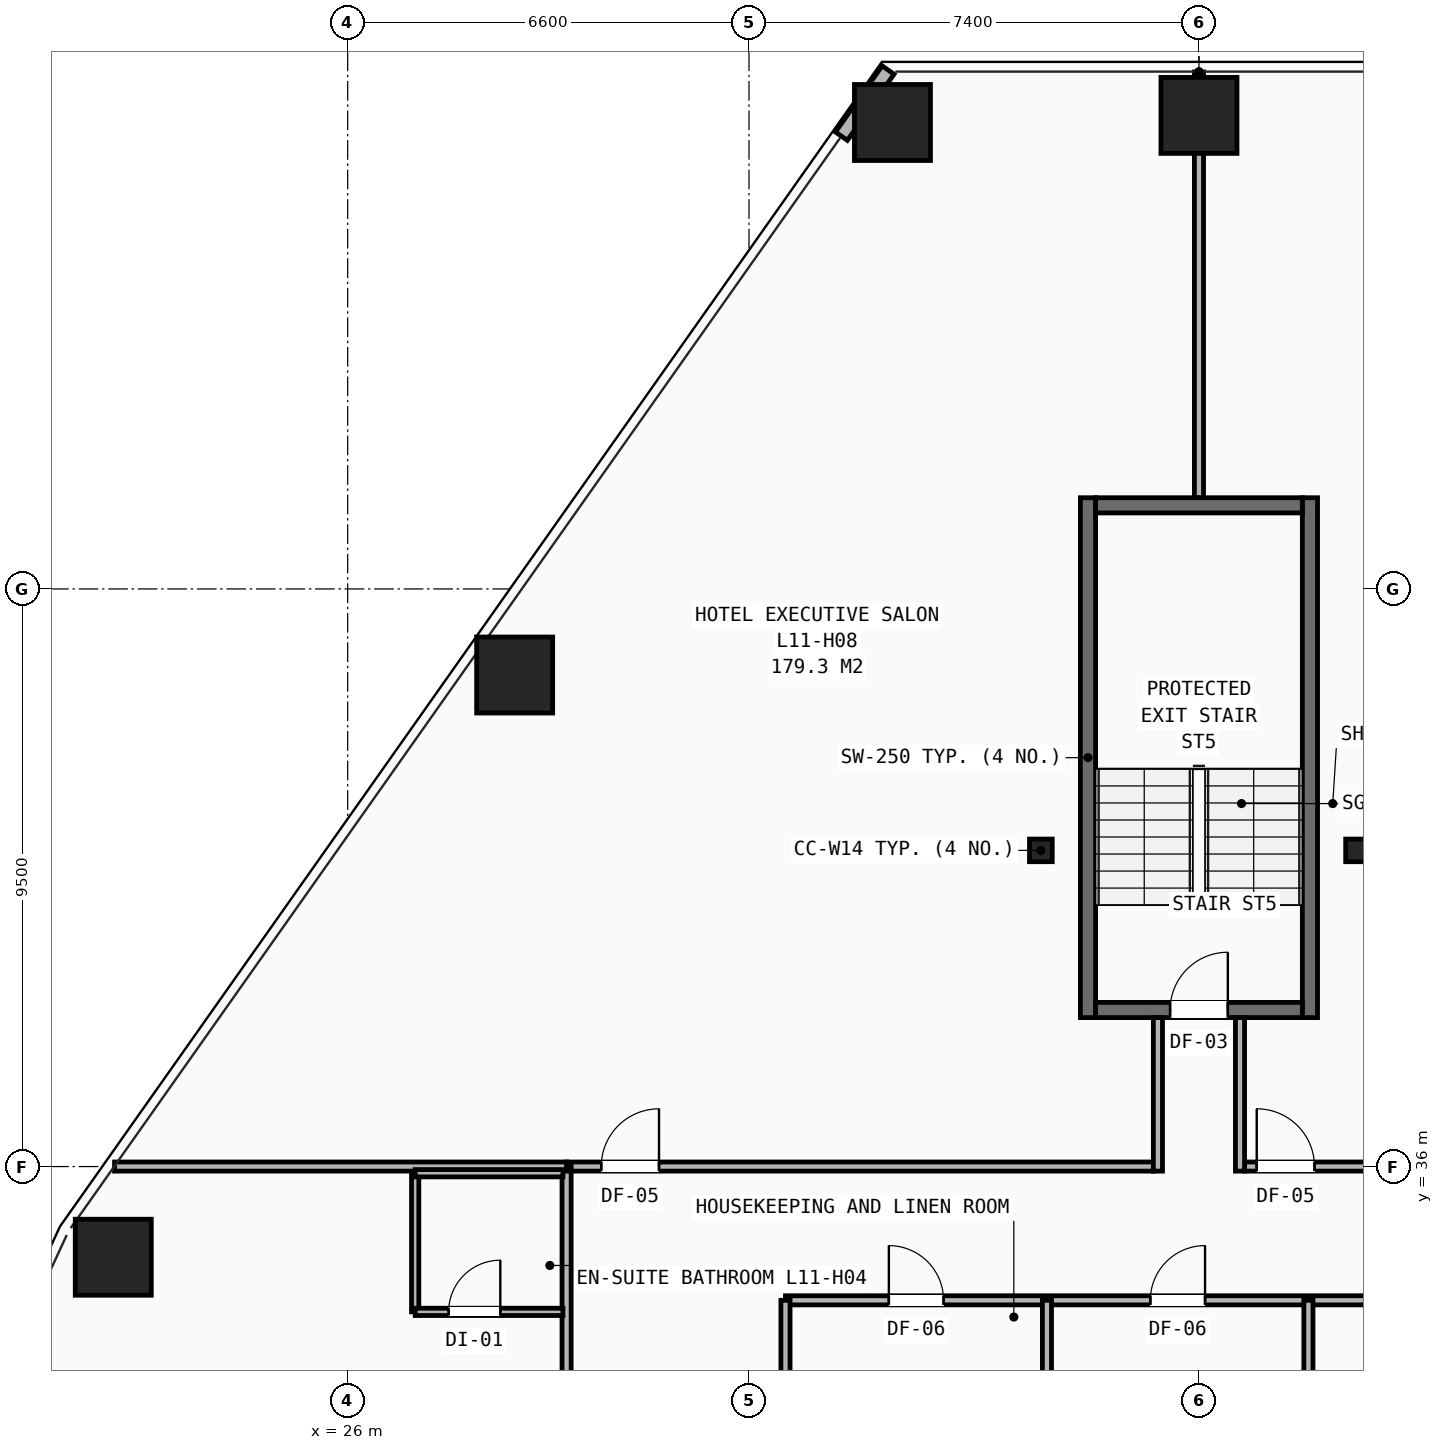
"""IFC4 building model, lengths in metres.
Left out: names, types, materials, properties, quantities, classifications, styles, units other than length and angle.
Written with IfcOpenShell. Run it as: python <this file> out.ifc"""

import sys

from ifc_helpers import new_model, si_unit, direction, frame, frame_2d, origin, origin_2d, place, context, subcontext, project, spatial, rectangle, hollow_rectangle, i_section, extrude, element, fill, save


model = new_model("IFC4")
c1 = context("Model", 3, precision=1e-05, world=origin(), true_north=direction((0.0, 1.0)))
c2 = subcontext(c1, "Body", "Model", "MODEL_VIEW")
j1 = project(units=[si_unit("LENGTHUNIT", "METRE"), si_unit("PLANEANGLEUNIT", "RADIAN")], contexts=[c1])
p1 = place(None, origin())
s1 = spatial("IfcSite", under=j1, at=p1, CompositionType="ELEMENT")
p2 = place(p1, origin())
s2 = spatial("IfcBuilding", under=s1, at=p2, CompositionType="ELEMENT")
p3 = place(p2, frame((0.0, 0.0, 43.2)))
s3 = spatial("IfcBuildingStorey", under=s2, at=p3, CompositionType="ELEMENT", Elevation=43.2)
for number, where, z_axis, x_axis in (
    (1, (37.4, 41.2, 0.0), (0.0, 0.0, 1.0), (1.0, 0.0, 0.0)),
    (2, (42.6, 41.2, 0.0), (0.0, 0.0, 1.0), (1.0, 0.0, 0.0)),
):
    element("IfcColumn", number, at=place(p3, frame(where, z_axis=z_axis, x_axis=x_axis)), inside=s3, PredefinedType="COLUMN", context=c2, shape_type="SweptSolid", body=[
        extrude(i_section(OverallWidth=0.374, OverallDepth=0.372, WebThickness=0.016, FlangeThickness=0.026, at=origin_2d()), origin(), (0.0, 0.0, 1.0), 3.2),
    ])
for number, where, z_axis, x_axis in (
    (3, (40.0, 53.289, 0.0), (0.0, 0.0, 1.0), (1.0, 0.0, 0.0)),
    (4, (34.959, 53.172, 0.0), (0.0, 0.0, 1.0), (1.0, 0.0, 0.0)),
    (5, (28.746, 44.084, 0.0), (0.0, 0.0, 1.0), (1.0, 0.0, 0.0)),
    (6, (22.145, 34.509, 0.0), (0.0, 0.0, 1.0), (1.0, 0.0, 0.0)),
):
    element("IfcColumn", number, at=place(p3, frame(where, z_axis=z_axis, x_axis=x_axis)), inside=s3, PredefinedType="COLUMN", context=c2, shape_type="SweptSolid", body=[
        extrude(hollow_rectangle(XDim=1.25, YDim=1.25, WallThickness=0.08, at=origin_2d()), origin(), (0.0, 0.0, 1.0), 3.2),
    ])
p4 = place(p3, frame((34.887, 54.035, 0.0), z_axis=(0.0, 0.0, 1.0), x_axis=(-0.576510403346, -0.817089808304, 0.0)))
e7 = element("IfcWall", 7, at=p4, inside=s3, PredefinedType="SHEAR", context=c2, shape_type="SweptSolid", body=[
    extrude(rectangle(XDim=1.332, YDim=0.24, at=frame_2d((0.666, 0.0))), origin(), (0.0, 0.0, 1.0), 2.263),
])
p5 = place(p3, frame((33.2, 33.8, 0.0), z_axis=(0.0, 0.0, 1.0), x_axis=(1.0, 0.0, 0.0)))
e8 = element("IfcWall", 8, at=p5, inside=s3, PredefinedType="PARTITIONING", context=c2, shape_type="SweptSolid", body=[
    extrude(rectangle(XDim=13.0, YDim=0.15, at=frame_2d((6.5, 0.0))), origin(), (0.0, 0.0, 1.0), 2.98),
])
p6 = place(p5, frame((1.7, 0.0, 0.0)))
e9 = element("IfcOpeningElement", 9, at=p6, cuts=e8, PredefinedType="OPENING", context=c2, shape_type="SweptSolid", body=[
    extrude(rectangle(XDim=0.9, YDim=2.1, at=frame_2d((0.45, 1.05))), frame((0.0, 0.085, 0.0), z_axis=(0.0, -1.0, 0.0), x_axis=(1.0, 0.0, 0.0)), (0.0, 0.0, 1.0), 0.17),
])
p7 = place(p5, frame((6.0, 0.0, 0.0)))
e10 = element("IfcOpeningElement", 10, at=p7, cuts=e8, PredefinedType="OPENING", context=c2, shape_type="SweptSolid", body=[
    extrude(rectangle(XDim=0.9, YDim=2.1, at=frame_2d((0.45, 1.05))), frame((0.0, 0.085, 0.0), z_axis=(0.0, -1.0, 0.0), x_axis=(1.0, 0.0, 0.0)), (0.0, 0.0, 1.0), 0.17),
])
p8 = place(p5, frame((10.35, 0.0, 0.0)))
e11 = element("IfcOpeningElement", 11, at=p8, cuts=e8, PredefinedType="OPENING", context=c2, shape_type="SweptSolid", body=[
    extrude(rectangle(XDim=0.9, YDim=2.1, at=frame_2d((0.45, 1.05))), frame((0.0, 0.085, 0.0), z_axis=(0.0, -1.0, 0.0), x_axis=(1.0, 0.0, 0.0)), (0.0, 0.0, 1.0), 0.17),
])
for number, where, z_axis, x_axis in (
    (12, (33.2, 31.2, 0.0), (0.0, 0.0, 1.0), (0.0, 1.0, 0.0)),
    (13, (37.5, 31.2, 0.0), (0.0, 0.0, 1.0), (0.0, 1.0, 0.0)),
    (14, (41.8, 31.2, 0.0), (0.0, 0.0, 1.0), (0.0, 1.0, 0.0)),
):
    element("IfcWall", number, at=place(p3, frame(where, z_axis=z_axis, x_axis=x_axis)), inside=s3, PredefinedType="PARTITIONING", context=c2, shape_type="SweptSolid", body=[
        extrude(rectangle(XDim=2.6, YDim=0.15, at=frame_2d((1.3, 0.0))), origin(), (0.0, 0.0, 1.0), 2.431),
    ])
p9 = place(p3, frame((29.6, 36.0, 0.0), z_axis=(0.0, 0.0, 1.0), x_axis=(1.0, 0.0, 0.0)))
e15 = element("IfcWall", 15, at=p9, inside=s3, PredefinedType="PARTITIONING", context=c2, shape_type="SweptSolid", body=[
    extrude(rectangle(XDim=9.65, YDim=0.15, at=frame_2d((4.825, 0.0))), origin(), (0.0, 0.0, 1.0), 2.98),
])
p10 = place(p9, frame((0.57, 0.0, 0.0)))
e16 = element("IfcOpeningElement", 16, at=p10, cuts=e15, PredefinedType="OPENING", context=c2, shape_type="SweptSolid", body=[
    extrude(rectangle(XDim=0.95, YDim=2.1, at=frame_2d((0.475, 1.05))), frame((0.0, 0.085, 0.0), z_axis=(0.0, -1.0, 0.0), x_axis=(1.0, 0.0, 0.0)), (0.0, 0.0, 1.0), 0.17),
])
p11 = place(p3, frame((40.75, 36.0, 0.0), z_axis=(0.0, 0.0, 1.0), x_axis=(1.0, 0.0, 0.0)))
e17 = element("IfcWall", 17, at=p11, inside=s3, PredefinedType="PARTITIONING", context=c2, shape_type="SweptSolid", body=[
    extrude(rectangle(XDim=9.65, YDim=0.15, at=frame_2d((4.825, 0.0))), origin(), (0.0, 0.0, 1.0), 2.513),
])
p12 = place(p11, frame((0.2, 0.0, 0.0)))
e18 = element("IfcOpeningElement", 18, at=p12, cuts=e17, PredefinedType="OPENING", context=c2, shape_type="SweptSolid", body=[
    extrude(rectangle(XDim=0.95, YDim=2.1, at=frame_2d((0.475, 1.05))), frame((0.0, 0.085, 0.0), z_axis=(0.0, -1.0, 0.0), x_axis=(1.0, 0.0, 0.0)), (0.0, 0.0, 1.0), 0.17),
])
p13 = place(p3, frame((29.6, 14.1, 0.0), z_axis=(0.0, 0.0, 1.0), x_axis=(0.0, 1.0, 0.0)))
e19 = element("IfcWall", 19, at=p13, inside=s3, PredefinedType="PARTITIONING", context=c2, shape_type="SweptSolid", body=[
    extrude(rectangle(XDim=21.9, YDim=0.15, at=frame_2d((10.95, 0.0))), origin(), (0.0, 0.0, 1.0), 2.191),
])
p14 = place(p13, frame((0.42, 0.0, 0.0)))
e20 = element("IfcOpeningElement", 20, at=p14, cuts=e19, PredefinedType="OPENING", context=c2, shape_type="SweptSolid", body=[
    extrude(rectangle(XDim=0.95, YDim=2.1, at=frame_2d((0.475, 1.05))), frame((0.0, 0.085, 0.0), z_axis=(0.0, -1.0, 0.0), x_axis=(1.0, 0.0, 0.0)), (0.0, 0.0, 1.0), 0.17),
])
p15 = place(p13, frame((11.32, 0.0, 0.0)))
e21 = element("IfcOpeningElement", 21, at=p15, cuts=e19, PredefinedType="OPENING", context=c2, shape_type="SweptSolid", body=[
    extrude(rectangle(XDim=0.95, YDim=2.1, at=frame_2d((0.475, 1.05))), frame((0.0, 0.085, 0.0), z_axis=(0.0, -1.0, 0.0), x_axis=(1.0, 0.0, 0.0)), (0.0, 0.0, 1.0), 0.17),
])
p16 = place(p3, frame((22.166, 36.0, 0.0), z_axis=(0.0, 0.0, 1.0), x_axis=(1.0, 0.0, 0.0)))
e22 = element("IfcWall", 22, at=p16, inside=s3, PredefinedType="PARTITIONING", context=c2, shape_type="SweptSolid", body=[
    extrude(rectangle(XDim=7.434, YDim=0.15, at=frame_2d((3.717, 0.0))), origin(), (0.0, 0.0, 1.0), 2.268),
])
p17 = place(p3, frame((27.11, 33.61, 0.0), z_axis=(0.0, 0.0, 1.0), x_axis=(0.0, 1.0, 0.0)))
e23 = element("IfcWall", 23, at=p17, inside=s3, PredefinedType="PARTITIONING", context=c2, shape_type="SweptSolid", body=[
    extrude(rectangle(XDim=2.28, YDim=0.12, at=frame_2d((1.14, 0.0))), origin(), (0.0, 0.0, 1.0), 2.513),
])
p18 = place(p3, frame((27.11, 33.61, 0.0), z_axis=(0.0, 0.0, 1.0), x_axis=(1.0, 0.0, 0.0)))
e24 = element("IfcWall", 24, at=p18, inside=s3, PredefinedType="PARTITIONING", context=c2, shape_type="SweptSolid", body=[
    extrude(rectangle(XDim=2.43, YDim=0.12, at=frame_2d((1.215, 0.0))), origin(), (0.0, 0.0, 1.0), 2.513),
])
p19 = place(p18, frame((0.55, 0.0, 0.0)))
e25 = element("IfcOpeningElement", 25, at=p19, cuts=e24, PredefinedType="OPENING", context=c2, shape_type="SweptSolid", body=[
    extrude(rectangle(XDim=0.85, YDim=2.05, at=frame_2d((0.425, 1.025))), frame((0.0, 0.07, 0.0), z_axis=(0.0, -1.0, 0.0), x_axis=(1.0, 0.0, 0.0)), (0.0, 0.0, 1.0), 0.14),
])
p20 = place(p3, frame((27.11, 35.89, 0.0), z_axis=(0.0, 0.0, 1.0), x_axis=(1.0, 0.0, 0.0)))
e26 = element("IfcWall", 26, at=p20, inside=s3, PredefinedType="PARTITIONING", context=c2, shape_type="SweptSolid", body=[
    extrude(rectangle(XDim=2.43, YDim=0.12, at=frame_2d((1.215, 0.0))), origin(), (0.0, 0.0, 1.0), 2.513),
])
p21 = place(p3, frame((40.0, 47.0, 0.0), z_axis=(0.0, 0.0, 1.0), x_axis=(0.0, 1.0, 0.0)))
e27 = element("IfcWall", 27, at=p21, inside=s3, PredefinedType="PARTITIONING", context=c2, shape_type="SweptSolid", body=[
    extrude(rectangle(XDim=7.004, YDim=0.15, at=frame_2d((3.502, 0.0))), origin(), (0.0, 0.0, 1.0), 2.268),
])
for number, where, z_axis, x_axis in (
    (28, (38.175, 38.45, 0.0), (0.0, 0.0, 1.0), (0.0, 1.0, 0.0)),
    (29, (41.825, 38.45, 0.0), (0.0, 0.0, 1.0), (0.0, 1.0, 0.0)),
):
    element("IfcWall", number, at=place(p3, frame(where, z_axis=z_axis, x_axis=x_axis)), inside=s3, PredefinedType="SHEAR", context=c2, shape_type="SweptSolid", body=[
        extrude(rectangle(XDim=8.55, YDim=0.25, at=frame_2d((4.275, 0.0))), origin(), (0.0, 0.0, 1.0), 2.98),
    ])
p22 = place(p3, frame((38.3, 38.575, 0.0), z_axis=(0.0, 0.0, 1.0), x_axis=(1.0, 0.0, 0.0)))
e30 = element("IfcWall", 30, at=p22, inside=s3, PredefinedType="SHEAR", context=c2, shape_type="SweptSolid", body=[
    extrude(rectangle(XDim=3.4, YDim=0.25, at=frame_2d((1.7, 0.0))), origin(), (0.0, 0.0, 1.0), 2.98),
])
p23 = place(p22, frame((1.225, 0.0, 0.0)))
e31 = element("IfcOpeningElement", 31, at=p23, cuts=e30, PredefinedType="OPENING", context=c2, shape_type="SweptSolid", body=[
    extrude(rectangle(XDim=0.95, YDim=2.1, at=frame_2d((0.475, 1.05))), frame((0.0, 0.135, 0.0), z_axis=(0.0, -1.0, 0.0), x_axis=(1.0, 0.0, 0.0)), (0.0, 0.0, 1.0), 0.27),
])
p24 = place(p3, frame((38.3, 46.875, 0.0), z_axis=(0.0, 0.0, 1.0), x_axis=(1.0, 0.0, 0.0)))
e32 = element("IfcWall", 32, at=p24, inside=s3, PredefinedType="SHEAR", context=c2, shape_type="SweptSolid", body=[
    extrude(rectangle(XDim=3.4, YDim=0.25, at=frame_2d((1.7, 0.0))), origin(), (0.0, 0.0, 1.0), 2.98),
])
for number, where, z_axis, x_axis in (
    (33, (39.325, 35.925, 0.0), (0.0, 0.0, 1.0), (0.0, 1.0, 0.0)),
    (34, (40.675, 35.925, 0.0), (0.0, 0.0, 1.0), (0.0, 1.0, 0.0)),
):
    element("IfcWall", number, at=place(p3, frame(where, z_axis=z_axis, x_axis=x_axis)), inside=s3, PredefinedType="PARTITIONING", context=c2, shape_type="SweptSolid", body=[
        extrude(rectangle(XDim=2.525, YDim=0.15, at=frame_2d((1.262, 0.0))), origin(), (0.0, 0.0, 1.0), 2.98),
    ])
p25 = place(p6, origin())
e35 = element("IfcDoor", 35, at=p25, inside=s3, OperationType="SINGLE_SWING_LEFT", PredefinedType="DOOR", context=c2, shape_type="SweptSolid", body=[
    extrude(rectangle(XDim=0.9, YDim=2.1, at=frame_2d((0.45, 1.05))), frame((0.0, 0.025, 0.0), z_axis=(0.0, -1.0, 0.0), x_axis=(1.0, 0.0, 0.0)), (0.0, 0.0, 1.0), 0.05),
])
fill(e9, e35)
p26 = place(p7, origin())
e36 = element("IfcDoor", 36, at=p26, inside=s3, OperationType="SINGLE_SWING_RIGHT", PredefinedType="DOOR", context=c2, shape_type="SweptSolid", body=[
    extrude(rectangle(XDim=0.9, YDim=2.1, at=frame_2d((0.45, 1.05))), frame((0.0, 0.025, 0.0), z_axis=(0.0, -1.0, 0.0), x_axis=(1.0, 0.0, 0.0)), (0.0, 0.0, 1.0), 0.05),
])
fill(e10, e36)
p27 = place(p19, origin())
e37 = element("IfcDoor", 37, at=p27, inside=s3, OperationType="SINGLE_SWING_RIGHT", PredefinedType="DOOR", context=c2, shape_type="SweptSolid", body=[
    extrude(rectangle(XDim=0.85, YDim=2.05, at=frame_2d((0.425, 1.025))), frame((0.0, 0.025, 0.0), z_axis=(0.0, -1.0, 0.0), x_axis=(1.0, 0.0, 0.0)), (0.0, 0.0, 1.0), 0.05),
])
fill(e25, e37)
p28 = place(p10, origin())
e38 = element("IfcDoor", 38, at=p28, inside=s3, OperationType="SINGLE_SWING_RIGHT", PredefinedType="DOOR", context=c2, shape_type="SweptSolid", body=[
    extrude(rectangle(XDim=0.95, YDim=2.1, at=frame_2d((0.475, 1.05))), frame((0.0, 0.025, 0.0), z_axis=(0.0, -1.0, 0.0), x_axis=(1.0, 0.0, 0.0)), (0.0, 0.0, 1.0), 0.05),
])
fill(e16, e38)
p29 = place(p12, origin())
e39 = element("IfcDoor", 39, at=p29, inside=s3, OperationType="SINGLE_SWING_LEFT", PredefinedType="DOOR", context=c2, shape_type="SweptSolid", body=[
    extrude(rectangle(XDim=0.95, YDim=2.1, at=frame_2d((0.475, 1.05))), frame((0.0, 0.025, 0.0), z_axis=(0.0, -1.0, 0.0), x_axis=(1.0, 0.0, 0.0)), (0.0, 0.0, 1.0), 0.05),
])
fill(e18, e39)
p30 = place(p23, origin())
e40 = element("IfcDoor", 40, at=p30, inside=s3, OperationType="SINGLE_SWING_RIGHT", PredefinedType="DOOR", context=c2, shape_type="SweptSolid", body=[
    extrude(rectangle(XDim=0.95, YDim=2.1, at=frame_2d((0.475, 1.05))), frame((0.0, 0.025, 0.0), z_axis=(0.0, -1.0, 0.0), x_axis=(1.0, 0.0, 0.0)), (0.0, 0.0, 1.0), 0.05),
])
fill(e31, e40)
save(model, sys.argv[1])
